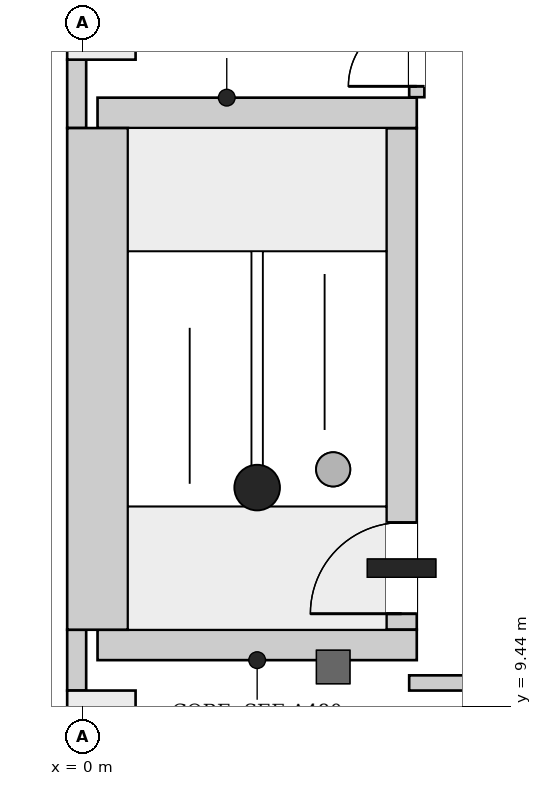
"""IFC4 building model, lengths in metres.
Left out: names, types, materials, properties, quantities, classifications, styles, units other than length and angle.
Written with IfcOpenShell. Run it as: python <this file> out.ifc"""

import sys

from ifc_helpers import new_model, si_unit, direction, frame, frame_2d, origin, origin_2d, place, context, subcontext, project, spatial, rectangle, extrude, element, fill, save


model = new_model("IFC4")
c1 = context("Model", 3, precision=1e-05, world=origin(), true_north=direction((0.0, 1.0)))
c2 = subcontext(c1, "Body", "Model", "MODEL_VIEW")
j1 = project(units=[si_unit("LENGTHUNIT", "METRE"), si_unit("PLANEANGLEUNIT", "RADIAN")], contexts=[c1])
p1 = place(None, origin())
s1 = spatial("IfcSite", under=j1, at=p1, CompositionType="ELEMENT")
p2 = place(p1, origin())
s2 = spatial("IfcBuilding", under=s1, at=p2, CompositionType="ELEMENT")
p3 = place(p2, frame((0.0, 0.0, 61.3)))
s3 = spatial("IfcBuildingStorey", under=s2, at=p3, CompositionType="ELEMENT", Elevation=61.3)
for number, where, z_axis, x_axis in (
    (1, (0.2, 10.25, 0.0), (0.0, 0.0, 1.0), (1.0, 0.0, 0.0)),
    (2, (0.2, 17.25, 0.0), (0.0, 0.0, 1.0), (1.0, 0.0, 0.0)),
):
    element("IfcWall", number, at=place(p3, frame(where, z_axis=z_axis, x_axis=x_axis)), inside=s3, PredefinedType="SHEAR", context=c2, shape_type="SweptSolid", body=[
        extrude(rectangle(XDim=4.2, YDim=0.4, at=frame_2d((2.1, 0.0))), origin(), (0.0, 0.0, 1.0), 4.2),
    ])
p4 = place(p3, frame((0.2, 10.45, 0.0), z_axis=(0.0, 0.0, 1.0), x_axis=(0.0, 1.0, 0.0)))
e3 = element("IfcWall", 3, at=p4, inside=s3, PredefinedType="SHEAR", context=c2, shape_type="SweptSolid", body=[
    extrude(rectangle(XDim=6.6, YDim=0.8, at=frame_2d((3.3, 0.0))), origin(), (0.0, 0.0, 1.0), 4.2),
])
p5 = place(p3, frame((4.2, 10.45, 0.0), z_axis=(0.0, 0.0, 1.0), x_axis=(0.0, 1.0, 0.0)))
e4 = element("IfcWall", 4, at=p5, inside=s3, PredefinedType="SHEAR", context=c2, shape_type="SweptSolid", body=[
    extrude(rectangle(XDim=6.6, YDim=0.4, at=frame_2d((3.3, 0.0))), origin(), (0.0, 0.0, 1.0), 4.2),
])
p6 = place(p5, frame((0.21, 0.0, 0.0)))
e5 = element("IfcOpeningElement", 5, at=p6, cuts=e4, PredefinedType="OPENING", context=c2, shape_type="SweptSolid", body=[
    extrude(rectangle(XDim=1.2, YDim=2.1, at=frame_2d((0.6, 1.05))), frame((0.0, 0.21, 0.0), z_axis=(0.0, -1.0, 0.0), x_axis=(1.0, 0.0, 0.0)), (0.0, 0.0, 1.0), 0.42),
])
for number, where, z_axis, x_axis in (
    (6, (0.25, 9.2, 0.0), (0.0, 0.0, 1.0), (1.0, 0.0, 0.0)),
    (7, (0.25, 18.4, 0.0), (0.0, 0.0, 1.0), (1.0, 0.0, 0.0)),
):
    element("IfcColumn", number, at=place(p3, frame(where, z_axis=z_axis, x_axis=x_axis)), inside=s3, PredefinedType="COLUMN", context=c2, shape_type="SweptSolid", body=[
        extrude(rectangle(XDim=0.9, YDim=0.9, at=origin_2d()), origin(), (0.0, 0.0, 1.0), 4.2),
    ])
p7 = place(p3, frame((-0.074, 10.45, 0.0), z_axis=(0.0, 0.0, 1.0), x_axis=(0.0, -1.0, 0.0)))
e8 = element("IfcWall", 8, at=p7, inside=s3, PredefinedType="ELEMENTEDWALL", context=c2, shape_type="SweptSolid", body=[
    extrude(rectangle(XDim=0.8, YDim=0.25, at=frame_2d((0.4, 0.0))), origin(), (0.0, 0.0, 1.0), 3.9),
])
p8 = place(p3, frame((-0.074, 17.95, 0.0), z_axis=(0.0, 0.0, 1.0), x_axis=(0.0, -1.0, 0.0)))
e9 = element("IfcWall", 9, at=p8, inside=s3, PredefinedType="ELEMENTEDWALL", context=c2, shape_type="SweptSolid", body=[
    extrude(rectangle(XDim=0.9, YDim=0.25, at=frame_2d((0.45, 0.0))), origin(), (0.0, 0.0, 1.0), 3.9),
])
p9 = place(p3, frame((4.3, 9.75, 0.0), z_axis=(0.0, 0.0, 1.0), x_axis=(1.0, 0.0, 0.0)))
e10 = element("IfcWall", 10, at=p9, inside=s3, PredefinedType="PARTITIONING", context=c2, shape_type="SweptSolid", body=[
    extrude(rectangle(XDim=43.894, YDim=0.2, at=frame_2d((21.947, 0.0))), origin(), (0.0, 0.0, 1.0), 3.9),
])
p10 = place(p9, frame((18.8, 0.0, 0.0)))
e11 = element("IfcOpeningElement", 11, at=p10, cuts=e10, PredefinedType="OPENING", context=c2, shape_type="SweptSolid", body=[
    extrude(rectangle(XDim=1.8, YDim=2.1, at=frame_2d((0.9, 1.05))), frame((0.0, 0.11, 0.0), z_axis=(0.0, -1.0, 0.0), x_axis=(1.0, 0.0, 0.0)), (0.0, 0.0, 1.0), 0.22),
])
p11 = place(p9, frame((28.7, 0.0, 0.0)))
e12 = element("IfcOpeningElement", 12, at=p11, cuts=e10, PredefinedType="OPENING", context=c2, shape_type="SweptSolid", body=[
    extrude(rectangle(XDim=1.2, YDim=2.1, at=frame_2d((0.6, 1.05))), frame((0.0, 0.11, 0.0), z_axis=(0.0, -1.0, 0.0), x_axis=(1.0, 0.0, 0.0)), (0.0, 0.0, 1.0), 0.22),
])
p12 = place(p9, frame((36.05, 0.0, 0.0)))
e13 = element("IfcOpeningElement", 13, at=p12, cuts=e10, PredefinedType="OPENING", context=c2, shape_type="SweptSolid", body=[
    extrude(rectangle(XDim=0.9, YDim=2.1, at=frame_2d((0.45, 1.05))), frame((0.0, 0.11, 0.0), z_axis=(0.0, -1.0, 0.0), x_axis=(1.0, 0.0, 0.0)), (0.0, 0.0, 1.0), 0.22),
])
p13 = place(p9, frame((40.8, 0.0, 0.0)))
e14 = element("IfcOpeningElement", 14, at=p13, cuts=e10, PredefinedType="OPENING", context=c2, shape_type="SweptSolid", body=[
    extrude(rectangle(XDim=1.2, YDim=2.1, at=frame_2d((0.6, 1.05))), frame((0.0, 0.11, 0.0), z_axis=(0.0, -1.0, 0.0), x_axis=(1.0, 0.0, 0.0)), (0.0, 0.0, 1.0), 0.22),
])
p14 = place(p3, frame((4.4, 17.456, 0.0), z_axis=(0.0, 0.0, 1.0), x_axis=(0.0, 1.0, 0.0)))
e15 = element("IfcWall", 15, at=p14, inside=s3, PredefinedType="PARTITIONING", context=c2, shape_type="SweptSolid", body=[
    extrude(rectangle(XDim=1.188, YDim=0.2, at=frame_2d((0.594, 0.0))), origin(), (0.0, 0.0, 1.0), 3.9),
])
p15 = place(p14, frame((0.144, 0.0, 0.0)))
e16 = element("IfcOpeningElement", 16, at=p15, cuts=e15, PredefinedType="OPENING", context=c2, shape_type="SweptSolid", body=[
    extrude(rectangle(XDim=0.9, YDim=2.1, at=frame_2d((0.45, 1.05))), frame((0.0, 0.11, 0.0), z_axis=(0.0, -1.0, 0.0), x_axis=(1.0, 0.0, 0.0)), (0.0, 0.0, 1.0), 0.22),
])
p16 = place(p6, origin())
e17 = element("IfcDoor", 17, at=p16, inside=s3, OperationType="SINGLE_SWING_RIGHT", PredefinedType="DOOR", context=c2, shape_type="SweptSolid", body=[
    extrude(rectangle(XDim=1.2, YDim=2.1, at=frame_2d((0.6, 1.05))), frame((0.0, 0.025, 0.0), z_axis=(0.0, -1.0, 0.0), x_axis=(1.0, 0.0, 0.0)), (0.0, 0.0, 1.0), 0.05),
])
fill(e5, e17)
p17 = place(p15, origin())
e18 = element("IfcDoor", 18, at=p17, inside=s3, OperationType="SINGLE_SWING_LEFT", PredefinedType="DOOR", context=c2, shape_type="SweptSolid", body=[
    extrude(rectangle(XDim=0.9, YDim=2.1, at=frame_2d((0.45, 1.05))), frame((0.0, 0.025, 0.0), z_axis=(0.0, -1.0, 0.0), x_axis=(1.0, 0.0, 0.0)), (0.0, 0.0, 1.0), 0.05),
])
fill(e16, e18)
save(model, sys.argv[1])
